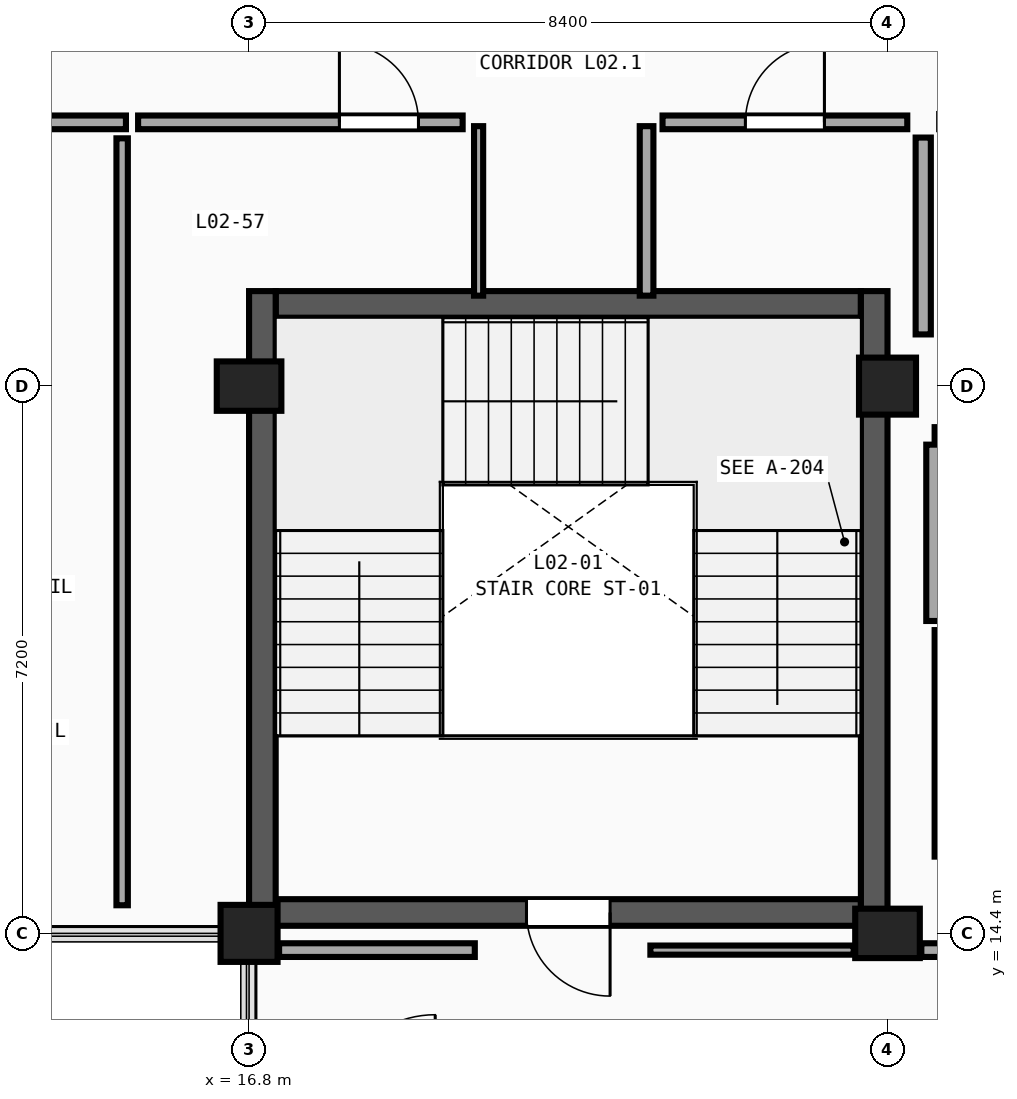
"""IFC4 building model, lengths in metres.
Left out: names, types, materials, properties, quantities, classifications, styles, units other than length and angle.
Written with IfcOpenShell. Run it as: python <this file> out.ifc"""

import sys

from ifc_helpers import new_model, si_unit, direction, frame, frame_2d, origin, origin_2d, place, context, subcontext, project, spatial, rectangle, extrude, element, fill, save


model = new_model("IFC4")
c1 = context("Model", 3, precision=1e-05, world=origin(), true_north=direction((0.0, 1.0)))
c2 = subcontext(c1, "Body", "Model", "MODEL_VIEW")
j1 = project(units=[si_unit("LENGTHUNIT", "METRE"), si_unit("PLANEANGLEUNIT", "RADIAN")], contexts=[c1])
p1 = place(None, origin())
s1 = spatial("IfcSite", under=j1, at=p1, CompositionType="ELEMENT")
p2 = place(p1, origin())
s2 = spatial("IfcBuilding", under=s1, at=p2, CompositionType="ELEMENT")
p3 = place(p2, frame((0.0, 0.0, 9.9)))
s3 = spatial("IfcBuildingStorey", under=s2, at=p3, CompositionType="ELEMENT", Elevation=9.9)
p4 = place(p3, frame((16.8, 14.4, 0.0), z_axis=(0.0, 0.0, 1.0), x_axis=(1.0, 0.0, 0.0)))
e1 = element("IfcColumn", 1, at=p4, inside=s3, PredefinedType="COLUMN", context=c2, shape_type="SweptSolid", body=[
    extrude(rectangle(XDim=0.75, YDim=0.75, at=origin_2d()), origin(), (0.0, 0.0, 1.0), 4.5),
])
for number, where, z_axis, x_axis in (
    (2, (16.8, 21.6, 0.0), (0.0, 0.0, 1.0), (1.0, 0.0, 0.0)),
    (3, (25.2, 14.4, 0.0), (0.0, 0.0, 1.0), (1.0, 0.0, 0.0)),
):
    element("IfcColumn", number, at=place(p3, frame(where, z_axis=z_axis, x_axis=x_axis)), inside=s3, PredefinedType="COLUMN", context=c2, shape_type="SweptSolid", body=[
        extrude(rectangle(XDim=0.85, YDim=0.65, at=origin_2d()), origin(), (0.0, 0.0, 1.0), 4.5),
    ])
p5 = place(p3, frame((25.2, 21.6, 0.0), z_axis=(0.0, 0.0, 1.0), x_axis=(1.0, 0.0, 0.0)))
e4 = element("IfcColumn", 4, at=p5, inside=s3, PredefinedType="COLUMN", context=c2, shape_type="SweptSolid", body=[
    extrude(rectangle(XDim=0.75, YDim=0.75, at=origin_2d()), origin(), (0.0, 0.0, 1.0), 4.5),
])
p6 = place(p3, frame((24.85, 14.675, 0.0), z_axis=(0.0, 0.0, 1.0), x_axis=(-1.0, 0.0, 0.0)))
e5 = element("IfcWall", 5, at=p6, inside=s3, PredefinedType="SHEAR", context=c2, shape_type="SweptSolid", body=[
    extrude(rectangle(XDim=7.7, YDim=0.35, at=frame_2d((3.85, 0.0))), origin(), (0.0, 0.0, 1.0), 4.5),
])
p7 = place(p6, frame((3.3, 0.0, 0.0)))
e6 = element("IfcOpeningElement", 6, at=p7, cuts=e5, PredefinedType="OPENING", context=c2, shape_type="SweptSolid", body=[
    extrude(rectangle(XDim=1.1, YDim=2.2, at=frame_2d((0.55, 1.1))), frame((0.0, 0.195, 0.0), z_axis=(0.0, -1.0, 0.0), x_axis=(1.0, 0.0, 0.0)), (0.0, 0.0, 1.0), 0.39),
])
p8 = place(p3, frame((17.15, 22.675, 0.0), z_axis=(0.0, 0.0, 1.0), x_axis=(1.0, 0.0, 0.0)))
e7 = element("IfcWall", 7, at=p8, inside=s3, PredefinedType="SHEAR", context=c2, shape_type="SweptSolid", body=[
    extrude(rectangle(XDim=7.7, YDim=0.35, at=frame_2d((3.85, 0.0))), origin(), (0.0, 0.0, 1.0), 4.5),
])
for number, where, z_axis, x_axis in (
    (8, (16.975, 22.85, 0.0), (0.0, 0.0, 1.0), (0.0, -1.0, 0.0)),
    (9, (25.025, 14.5, 0.0), (0.0, 0.0, 1.0), (0.0, 1.0, 0.0)),
):
    element("IfcWall", number, at=place(p3, frame(where, z_axis=z_axis, x_axis=x_axis)), inside=s3, PredefinedType="SHEAR", context=c2, shape_type="SweptSolid", body=[
        extrude(rectangle(XDim=8.35, YDim=0.35, at=frame_2d((4.175, 0.0))), origin(), (0.0, 0.0, 1.0), 4.5),
    ])
p9 = place(p3, frame((25.94, 18.39, 0.0), z_axis=(0.0, 0.0, 1.0), x_axis=(0.0, -1.0, 0.0)))
e10 = element("IfcWall", 10, at=p9, inside=s3, PredefinedType="SHEAR", context=c2, shape_type="SweptSolid", body=[
    extrude(rectangle(XDim=2.98, YDim=0.24, at=frame_2d((1.49, 0.0))), origin(), (0.0, 0.0, 1.0), 4.18),
])
p10 = place(p3, frame((25.82, 20.95, 0.0), z_axis=(0.0, 0.0, 1.0), x_axis=(1.0, 0.0, 0.0)))
e11 = element("IfcWall", 11, at=p10, inside=s3, PredefinedType="SOLIDWALL", context=c2, shape_type="SweptSolid", body=[
    extrude(rectangle(XDim=2.54, YDim=0.22, at=frame_2d((1.27, 0.0))), origin(), (0.0, 0.0, 1.0), 3.73),
])
p11 = place(p10, frame((0.745, 0.0, 0.0)))
e12 = element("IfcOpeningElement", 12, at=p11, cuts=e11, PredefinedType="OPENING", context=c2, shape_type="SweptSolid", body=[
    extrude(rectangle(XDim=1.05, YDim=2.15, at=frame_2d((0.525, 1.075))), frame((0.0, 0.13, 0.0), z_axis=(0.0, -1.0, 0.0), x_axis=(1.0, 0.0, 0.0)), (0.0, 0.0, 1.0), 0.26),
])
p12 = place(p3, frame((25.82, 18.51, 0.0), z_axis=(0.0, 0.0, 1.0), x_axis=(0.0, 1.0, 0.0)))
e13 = element("IfcWall", 13, at=p12, inside=s3, PredefinedType="SOLIDWALL", context=c2, shape_type="SweptSolid", body=[
    extrude(rectangle(XDim=2.32, YDim=0.22, at=frame_2d((1.16, 0.0))), origin(), (0.0, 0.0, 1.0), 4.18),
])
p13 = place(p3, frame((0.73, 25.07, 0.0), z_axis=(0.0, 0.0, 1.0), x_axis=(1.0, 0.0, 0.0)))
e14 = element("IfcWall", 14, at=p13, inside=s3, PredefinedType="PARTITIONING", context=c2, shape_type="SweptSolid", body=[
    extrude(rectangle(XDim=14.45, YDim=0.18, at=frame_2d((7.225, 0.0))), origin(), (0.0, 0.0, 1.0), 4.18),
])
p14 = place(p13, frame((6.465, 0.0, 0.0)))
e15 = element("IfcOpeningElement", 15, at=p14, cuts=e14, PredefinedType="OPENING", context=c2, shape_type="SweptSolid", body=[
    extrude(rectangle(XDim=1.52, YDim=2.13, at=frame_2d((0.76, 1.065))), frame((0.0, 0.11, 0.0), z_axis=(0.0, -1.0, 0.0), x_axis=(1.0, 0.0, 0.0)), (0.0, 0.0, 1.0), 0.22),
])
p15 = place(p3, frame((22.08, 14.18, 0.0), z_axis=(0.0, 0.0, 1.0), x_axis=(1.0, 0.0, 0.0)))
e16 = element("IfcWall", 16, at=p15, inside=s3, PredefinedType="PARTITIONING", context=c2, shape_type="SweptSolid", body=[
    extrude(rectangle(XDim=2.675, YDim=0.12, at=frame_2d((1.337, 0.0))), origin(), (0.0, 0.0, 1.0), 3.73),
])
p16 = place(p3, frame((25.645, 14.18, 0.0), z_axis=(0.0, 0.0, 1.0), x_axis=(1.0, 0.0, 0.0)))
e17 = element("IfcWall", 17, at=p16, inside=s3, PredefinedType="PARTITIONING", context=c2, shape_type="SweptSolid", body=[
    extrude(rectangle(XDim=7.56, YDim=0.18, at=frame_2d((3.78, 0.0))), origin(), (0.0, 0.0, 1.0), 3.73),
])
p17 = place(p16, frame((3.26, 0.0, 0.0)))
e18 = element("IfcOpeningElement", 18, at=p17, cuts=e17, PredefinedType="OPENING", context=c2, shape_type="SweptSolid", body=[
    extrude(rectangle(XDim=1.04, YDim=2.37, at=frame_2d((0.52, 1.185))), frame((0.0, 0.11, 0.0), z_axis=(0.0, -1.0, 0.0), x_axis=(1.0, 0.0, 0.0)), (0.0, 0.0, 1.0), 0.22),
])
p18 = place(p3, frame((15.34, 25.07, 0.0), z_axis=(0.0, 0.0, 1.0), x_axis=(1.0, 0.0, 0.0)))
e19 = element("IfcWall", 19, at=p18, inside=s3, PredefinedType="PARTITIONING", context=c2, shape_type="SweptSolid", body=[
    extrude(rectangle(XDim=4.27, YDim=0.18, at=frame_2d((2.135, 0.0))), origin(), (0.0, 0.0, 1.0), 4.18),
])
p19 = place(p18, frame((2.649, 0.0, 0.0)))
e20 = element("IfcOpeningElement", 20, at=p19, cuts=e19, PredefinedType="OPENING", context=c2, shape_type="SweptSolid", body=[
    extrude(rectangle(XDim=1.04, YDim=2.05, at=frame_2d((0.52, 1.025))), frame((0.0, 0.11, 0.0), z_axis=(0.0, -1.0, 0.0), x_axis=(1.0, 0.0, 0.0)), (0.0, 0.0, 1.0), 0.22),
])
p20 = place(p3, frame((22.24, 25.07, 0.0), z_axis=(0.0, 0.0, 1.0), x_axis=(1.0, 0.0, 0.0)))
e21 = element("IfcWall", 21, at=p20, inside=s3, PredefinedType="PARTITIONING", context=c2, shape_type="SweptSolid", body=[
    extrude(rectangle(XDim=3.22, YDim=0.18, at=frame_2d((1.61, 0.0))), origin(), (0.0, 0.0, 1.0), 4.18),
])
p21 = place(p20, frame((1.09, 0.0, 0.0)))
e22 = element("IfcOpeningElement", 22, at=p21, cuts=e21, PredefinedType="OPENING", context=c2, shape_type="SweptSolid", body=[
    extrude(rectangle(XDim=1.04, YDim=2.21, at=frame_2d((0.52, 1.105))), frame((0.0, 0.11, 0.0), z_axis=(0.0, -1.0, 0.0), x_axis=(1.0, 0.0, 0.0)), (0.0, 0.0, 1.0), 0.22),
])
p22 = place(p3, frame((17.195, 14.18, 0.0), z_axis=(0.0, 0.0, 1.0), x_axis=(1.0, 0.0, 0.0)))
e23 = element("IfcWall", 23, at=p22, inside=s3, PredefinedType="PARTITIONING", context=c2, shape_type="SweptSolid", body=[
    extrude(rectangle(XDim=2.575, YDim=0.18, at=frame_2d((1.288, 0.0))), origin(), (0.0, 0.0, 1.0), 3.73),
])
p23 = place(p3, frame((19.82, 22.79, 0.0), z_axis=(0.0, 0.0, 1.0), x_axis=(0.0, 1.0, 0.0)))
e24 = element("IfcWall", 24, at=p23, inside=s3, PredefinedType="PARTITIONING", context=c2, shape_type="SweptSolid", body=[
    extrude(rectangle(XDim=2.23, YDim=0.12, at=frame_2d((1.115, 0.0))), origin(), (0.0, 0.0, 1.0), 4.18),
])
p24 = place(p3, frame((22.03, 22.79, 0.0), z_axis=(0.0, 0.0, 1.0), x_axis=(0.0, 1.0, 0.0)))
e25 = element("IfcWall", 25, at=p24, inside=s3, PredefinedType="PARTITIONING", context=c2, shape_type="SweptSolid", body=[
    extrude(rectangle(XDim=2.23, YDim=0.18, at=frame_2d((1.115, 0.0))), origin(), (0.0, 0.0, 1.0), 4.18),
])
p25 = place(p3, frame((15.13, 14.77, 0.0), z_axis=(0.0, 0.0, 1.0), x_axis=(0.0, 1.0, 0.0)))
e26 = element("IfcWall", 26, at=p25, inside=s3, PredefinedType="PARTITIONING", context=c2, shape_type="SweptSolid", body=[
    extrude(rectangle(XDim=10.09, YDim=0.15, at=frame_2d((5.045, 0.0))), origin(), (0.0, 0.0, 1.0), 4.18),
])
p26 = place(p3, frame((25.67, 22.28, 0.0), z_axis=(0.0, 0.0, 1.0), x_axis=(0.0, 1.0, 0.0)))
e27 = element("IfcWall", 27, at=p26, inside=s3, PredefinedType="PLUMBINGWALL", context=c2, shape_type="SweptSolid", body=[
    extrude(rectangle(XDim=2.59, YDim=0.2, at=frame_2d((1.295, 0.0))), origin(), (0.0, 0.0, 1.0), 4.18),
])
p27 = place(p7, origin())
e28 = element("IfcDoor", 28, at=p27, inside=s3, OperationType="SINGLE_SWING_LEFT", PredefinedType="DOOR", context=c2, shape_type="SweptSolid", body=[
    extrude(rectangle(XDim=1.1, YDim=2.2, at=frame_2d((0.55, 1.1))), frame((0.0, 0.025, 0.0), z_axis=(0.0, -1.0, 0.0), x_axis=(1.0, 0.0, 0.0)), (0.0, 0.0, 1.0), 0.05),
])
fill(e6, e28)
p28 = place(p19, origin())
e29 = element("IfcDoor", 29, at=p28, inside=s3, OperationType="SINGLE_SWING_LEFT", PredefinedType="DOOR", context=c2, shape_type="SweptSolid", body=[
    extrude(rectangle(XDim=1.04, YDim=2.05, at=frame_2d((0.52, 1.025))), frame((0.0, 0.025, 0.0), z_axis=(0.0, -1.0, 0.0), x_axis=(1.0, 0.0, 0.0)), (0.0, 0.0, 1.0), 0.05),
])
fill(e20, e29)
p29 = place(p21, origin())
e30 = element("IfcDoor", 30, at=p29, inside=s3, OperationType="SINGLE_SWING_RIGHT", PredefinedType="DOOR", context=c2, shape_type="SweptSolid", body=[
    extrude(rectangle(XDim=1.04, YDim=2.21, at=frame_2d((0.52, 1.105))), frame((0.0, 0.025, 0.0), z_axis=(0.0, -1.0, 0.0), x_axis=(1.0, 0.0, 0.0)), (0.0, 0.0, 1.0), 0.05),
])
fill(e22, e30)
save(model, sys.argv[1])
